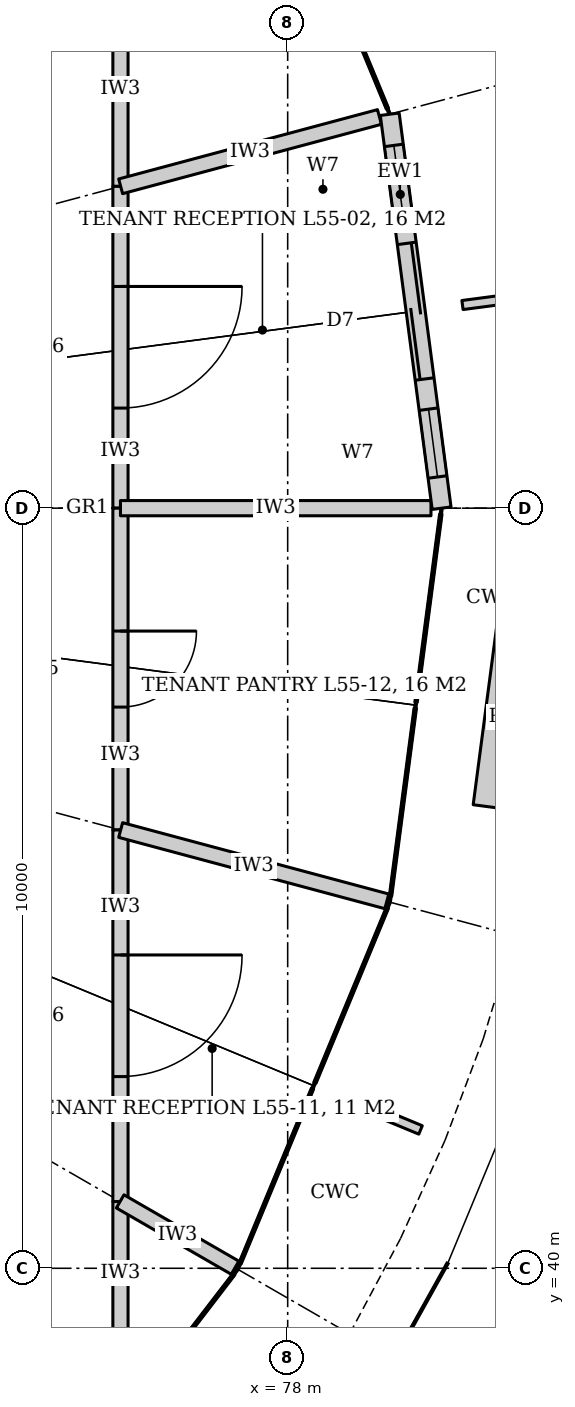
"""IFC4 building model, lengths in metres.
Left out: names, types, materials, properties, quantities, classifications, styles, units other than length and angle.
Written with IfcOpenShell. Run it as: python <this file> out.ifc"""

import sys

from ifc_helpers import new_model, si_unit, direction, frame, frame_2d, origin, place, context, subcontext, project, spatial, rectangle, extrude, element, fill, save


model = new_model("IFC4")
c1 = context("Model", 3, precision=1e-05, world=origin(), true_north=direction((0.0, 1.0)))
c2 = subcontext(c1, "Body", "Model", "MODEL_VIEW")
j1 = project(units=[si_unit("LENGTHUNIT", "METRE"), si_unit("PLANEANGLEUNIT", "RADIAN")], contexts=[c1])
p1 = place(None, origin())
s1 = spatial("IfcSite", under=j1, at=p1, CompositionType="ELEMENT")
p2 = place(p1, origin())
s2 = spatial("IfcBuilding", under=s1, at=p2, CompositionType="ELEMENT")
p3 = place(p2, frame((0.0, 0.0, 240.2)))
s3 = spatial("IfcBuildingStorey", under=s2, at=p3, CompositionType="ELEMENT", Elevation=240.2)
p4 = place(p3, frame((75.8, 58.8, 0.0), z_axis=(0.0, 0.0, 1.0), x_axis=(0.0, -1.0, 0.0)))
e1 = element("IfcWall", 1, at=p4, inside=s3, PredefinedType="PARTITIONING", context=c2, shape_type="SweptSolid", body=[
    extrude(rectangle(XDim=4.566, YDim=0.2, at=frame_2d((2.283, 0.0))), origin(), (0.0, 0.0, 1.0), 3.02),
])
p5 = place(p3, frame((75.8, 54.234, 0.0), z_axis=(0.0, 0.0, 1.0), x_axis=(0.0, -1.0, 0.0)))
e2 = element("IfcWall", 2, at=p5, inside=s3, PredefinedType="PARTITIONING", context=c2, shape_type="SweptSolid", body=[
    extrude(rectangle(XDim=4.234, YDim=0.2, at=frame_2d((2.117, 0.0))), origin(), (0.0, 0.0, 1.0), 3.02),
])
p6 = place(p5, frame((1.317, 0.0, 0.0)))
e3 = element("IfcOpeningElement", 3, at=p6, cuts=e2, PredefinedType="OPENING", context=c2, shape_type="SweptSolid", body=[
    extrude(rectangle(XDim=1.6, YDim=2.4, at=frame_2d((0.8, 1.2))), frame((0.0, 0.11, 0.0), z_axis=(0.0, -1.0, 0.0), x_axis=(1.0, 0.0, 0.0)), (0.0, 0.0, 1.0), 0.22),
])
p7 = place(p3, frame((75.8, 50.0, 0.0), z_axis=(0.0, 0.0, 1.0), x_axis=(0.0, -1.0, 0.0)))
e4 = element("IfcWall", 4, at=p7, inside=s3, PredefinedType="PARTITIONING", context=c2, shape_type="SweptSolid", body=[
    extrude(rectangle(XDim=4.234, YDim=0.2, at=frame_2d((2.117, 0.0))), origin(), (0.0, 0.0, 1.0), 3.02),
])
p8 = place(p7, frame((1.617, 0.0, 0.0)))
e5 = element("IfcOpeningElement", 5, at=p8, cuts=e4, PredefinedType="OPENING", context=c2, shape_type="SweptSolid", body=[
    extrude(rectangle(XDim=1.0, YDim=2.1, at=frame_2d((0.5, 1.05))), frame((0.0, 0.11, 0.0), z_axis=(0.0, -1.0, 0.0), x_axis=(1.0, 0.0, 0.0)), (0.0, 0.0, 1.0), 0.22),
])
p9 = place(p3, frame((75.8, 45.766, 0.0), z_axis=(0.0, 0.0, 1.0), x_axis=(0.0, -1.0, 0.0)))
e6 = element("IfcWall", 6, at=p9, inside=s3, PredefinedType="PARTITIONING", context=c2, shape_type="SweptSolid", body=[
    extrude(rectangle(XDim=4.888, YDim=0.2, at=frame_2d((2.444, 0.0))), origin(), (0.0, 0.0, 1.0), 3.02),
])
p10 = place(p9, frame((1.644, 0.0, 0.0)))
e7 = element("IfcOpeningElement", 7, at=p10, cuts=e6, PredefinedType="OPENING", context=c2, shape_type="SweptSolid", body=[
    extrude(rectangle(XDim=1.6, YDim=2.4, at=frame_2d((0.8, 1.2))), frame((0.0, 0.11, 0.0), z_axis=(0.0, -1.0, 0.0), x_axis=(1.0, 0.0, 0.0)), (0.0, 0.0, 1.0), 0.22),
])
p11 = place(p3, frame((75.8, 40.878, 0.0), z_axis=(0.0, 0.0, 1.0), x_axis=(0.0, -1.0, 0.0)))
e8 = element("IfcWall", 8, at=p11, inside=s3, PredefinedType="PARTITIONING", context=c2, shape_type="SweptSolid", body=[
    extrude(rectangle(XDim=1.878, YDim=0.2, at=frame_2d((0.939, 0.0))), origin(), (0.0, 0.0, 1.0), 3.02),
])
p12 = place(p3, frame((75.8, 50.0, 0.0), z_axis=(0.0, 0.0, 1.0), x_axis=(1.0, 0.0, 0.0)))
e9 = element("IfcWall", 9, at=p12, inside=s3, PredefinedType="PARTITIONING", context=c2, shape_type="SweptSolid", body=[
    extrude(rectangle(XDim=4.085, YDim=0.2, at=frame_2d((2.042, 0.0))), origin(), (0.0, 0.0, 1.0), 3.02),
])
p13 = place(p3, frame((75.802, 54.234, 0.0), z_axis=(0.0, 0.0, 1.0), x_axis=(0.965944651358, 0.258748778768, 0.0)))
e10 = element("IfcWall", 10, at=p13, inside=s3, PredefinedType="PARTITIONING", context=c2, shape_type="SweptSolid", body=[
    extrude(rectangle(XDim=3.525, YDim=0.2, at=frame_2d((1.763, 0.0))), origin(), (0.0, 0.0, 1.0), 3.02),
])
p14 = place(p3, frame((75.796, 40.88, 0.0), z_axis=(0.0, 0.0, 1.0), x_axis=(0.866073756611, -0.499916241094, 0.0)))
e11 = element("IfcWall", 11, at=p14, inside=s3, PredefinedType="PARTITIONING", context=c2, shape_type="SweptSolid", body=[
    extrude(rectangle(XDim=1.745, YDim=0.2, at=frame_2d((0.873, 0.0))), origin(), (0.0, 0.0, 1.0), 3.02),
])
p15 = place(p3, frame((75.802, 45.766, 0.0), z_axis=(0.0, 0.0, 1.0), x_axis=(0.965924602504, -0.258823612287, 0.0)))
e12 = element("IfcWall", 12, at=p15, inside=s3, PredefinedType="PARTITIONING", context=c2, shape_type="SweptSolid", body=[
    extrude(rectangle(XDim=3.625, YDim=0.2, at=frame_2d((1.812, 0.0))), origin(), (0.0, 0.0, 1.0), 3.02),
])
p16 = place(p3, frame((80.025, 50.0, 0.0), z_axis=(0.0, 0.0, 1.0), x_axis=(-0.130487131216, 0.99145000307, 0.0)))
e13 = element("IfcWall", 13, at=p16, inside=s3, PredefinedType="SOLIDWALL", context=c2, shape_type="SweptSolid", body=[
    extrude(rectangle(XDim=5.228, YDim=0.25, at=frame_2d((2.614, 0.0))), origin(), (0.0, 0.0, 1.0), 4.04),
])
p17 = place(p16, frame((1.714, 0.0, 0.0)))
e14 = element("IfcOpeningElement", 14, at=p17, cuts=e13, PredefinedType="OPENING", context=c2, shape_type="SweptSolid", body=[
    extrude(rectangle(XDim=1.8, YDim=2.4, at=frame_2d((0.9, 1.2))), frame((0.0, 0.135, 0.0), z_axis=(0.0, -1.0, 0.0), x_axis=(1.0, 0.0, 0.0)), (0.0, 0.0, 1.0), 0.27),
])
p18 = place(p16, frame((0.414, 0.0, 0.0)))
e15 = element("IfcOpeningElement", 15, at=p18, cuts=e13, PredefinedType="OPENING", context=c2, shape_type="SweptSolid", body=[
    extrude(rectangle(XDim=0.9, YDim=2.4, at=frame_2d((0.45, 1.2))), frame((0.0, 0.135, 0.0), z_axis=(0.0, -1.0, 0.0), x_axis=(1.0, 0.0, 0.0)), (0.0, 0.0, 1.0), 0.27),
])
p19 = place(p16, frame((3.914, 0.0, 0.0)))
e16 = element("IfcOpeningElement", 16, at=p19, cuts=e13, PredefinedType="OPENING", context=c2, shape_type="SweptSolid", body=[
    extrude(rectangle(XDim=0.9, YDim=2.4, at=frame_2d((0.45, 1.2))), frame((0.0, 0.135, 0.0), z_axis=(0.0, -1.0, 0.0), x_axis=(1.0, 0.0, 0.0)), (0.0, 0.0, 1.0), 0.27),
])
p20 = place(p6, origin())
e17 = element("IfcDoor", 17, at=p20, inside=s3, OperationType="DOUBLE_DOOR_DOUBLE_SWING", PredefinedType="DOOR", context=c2, shape_type="SweptSolid", body=[
    extrude(rectangle(XDim=1.6, YDim=2.4, at=frame_2d((0.8, 1.2))), frame((0.0, 0.025, 0.0), z_axis=(0.0, -1.0, 0.0), x_axis=(1.0, 0.0, 0.0)), (0.0, 0.0, 1.0), 0.05),
])
fill(e3, e17)
p21 = place(p10, origin())
e18 = element("IfcDoor", 18, at=p21, inside=s3, OperationType="DOUBLE_DOOR_DOUBLE_SWING", PredefinedType="DOOR", context=c2, shape_type="SweptSolid", body=[
    extrude(rectangle(XDim=1.6, YDim=2.4, at=frame_2d((0.8, 1.2))), frame((0.0, 0.025, 0.0), z_axis=(0.0, -1.0, 0.0), x_axis=(1.0, 0.0, 0.0)), (0.0, 0.0, 1.0), 0.05),
])
fill(e7, e18)
p22 = place(p8, origin())
e19 = element("IfcDoor", 19, at=p22, inside=s3, OperationType="SINGLE_SWING_LEFT", PredefinedType="DOOR", context=c2, shape_type="SweptSolid", body=[
    extrude(rectangle(XDim=1.0, YDim=2.1, at=frame_2d((0.5, 1.05))), frame((0.0, 0.025, 0.0), z_axis=(0.0, -1.0, 0.0), x_axis=(1.0, 0.0, 0.0)), (0.0, 0.0, 1.0), 0.05),
])
fill(e5, e19)
p23 = place(p17, origin())
e20 = element("IfcDoor", 20, at=p23, inside=s3, OperationType="DOUBLE_DOOR_SLIDING", PredefinedType="DOOR", context=c2, shape_type="SweptSolid", body=[
    extrude(rectangle(XDim=1.8, YDim=2.4, at=frame_2d((0.9, 1.2))), frame((0.0, 0.025, 0.0), z_axis=(0.0, -1.0, 0.0), x_axis=(1.0, 0.0, 0.0)), (0.0, 0.0, 1.0), 0.05),
])
fill(e14, e20)
p24 = place(p18, origin())
e21 = element("IfcWindow", 21, at=p24, inside=s3, PartitioningType="SINGLE_PANEL", PredefinedType="WINDOW", context=c2, shape_type="SweptSolid", body=[
    extrude(rectangle(XDim=0.9, YDim=2.4, at=frame_2d((0.45, 1.2))), frame((0.0, 0.03, 0.0), z_axis=(0.0, -1.0, 0.0), x_axis=(1.0, 0.0, 0.0)), (0.0, 0.0, 1.0), 0.06),
])
fill(e15, e21)
p25 = place(p19, origin())
e22 = element("IfcWindow", 22, at=p25, inside=s3, PartitioningType="SINGLE_PANEL", PredefinedType="WINDOW", context=c2, shape_type="SweptSolid", body=[
    extrude(rectangle(XDim=0.9, YDim=2.4, at=frame_2d((0.45, 1.2))), frame((0.0, 0.03, 0.0), z_axis=(0.0, -1.0, 0.0), x_axis=(1.0, 0.0, 0.0)), (0.0, 0.0, 1.0), 0.06),
])
fill(e16, e22)
save(model, sys.argv[1])
